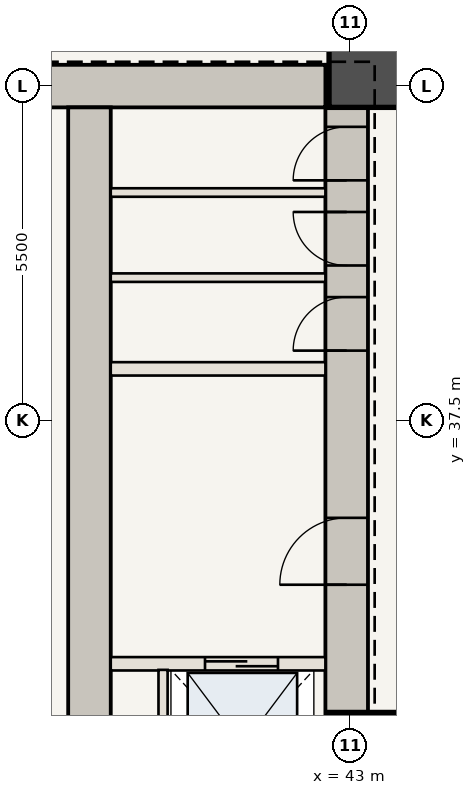
"""IFC4 building model, lengths in metres.
Left out: names, types, materials, properties, quantities, classifications, styles, units other than length and angle.
Written with IfcOpenShell. Run it as: python <this file> out.ifc"""

import sys

from ifc_helpers import new_model, si_unit, direction, frame, frame_2d, origin, origin_2d, place, context, subcontext, project, spatial, rectangle, extrude, element, fill, save


model = new_model("IFC4")
c1 = context("Model", 3, precision=1e-05, world=origin(), true_north=direction((0.0, 1.0)))
c2 = subcontext(c1, "Body", "Model", "MODEL_VIEW")
j1 = project(units=[si_unit("LENGTHUNIT", "METRE"), si_unit("PLANEANGLEUNIT", "RADIAN")], contexts=[c1])
p1 = place(None, origin())
s1 = spatial("IfcSite", under=j1, at=p1, CompositionType="ELEMENT")
p2 = place(p1, origin())
s2 = spatial("IfcBuilding", under=s1, at=p2, CompositionType="ELEMENT")
p3 = place(p2, frame((0.0, 0.0, 29.4)))
s3 = spatial("IfcBuildingStorey", under=s2, at=p3, CompositionType="ELEMENT", Elevation=29.4)
p4 = place(p3, frame((42.94, 30.6, 0.0), z_axis=(0.0, 0.0, 1.0), x_axis=(0.0, 1.0, 0.0)))
e1 = element("IfcWall", 1, at=p4, inside=s3, PredefinedType="SHEAR", context=c2, shape_type="SweptSolid", body=[
    extrude(rectangle(XDim=12.75, YDim=0.7, at=frame_2d((6.375, 0.0))), origin(), (0.0, 0.0, 1.0), 4.9),
])
p5 = place(p4, frame((4.2, 0.0, 0.0)))
e2 = element("IfcOpeningElement", 2, at=p5, cuts=e1, PredefinedType="OPENING", context=c2, shape_type="SweptSolid", body=[
    extrude(rectangle(XDim=1.1, YDim=2.15, at=frame_2d((0.55, 1.075))), frame((0.0, 0.36, 0.0), z_axis=(0.0, -1.0, 0.0), x_axis=(1.0, 0.0, 0.0)), (0.0, 0.0, 1.0), 0.72),
])
p6 = place(p4, frame((8.05, 0.0, 0.0)))
e3 = element("IfcOpeningElement", 3, at=p6, cuts=e1, PredefinedType="OPENING", context=c2, shape_type="SweptSolid", body=[
    extrude(rectangle(XDim=0.88, YDim=2.1, at=frame_2d((0.44, 1.05))), frame((0.0, 0.36, 0.0), z_axis=(0.0, -1.0, 0.0), x_axis=(1.0, 0.0, 0.0)), (0.0, 0.0, 1.0), 0.72),
])
p7 = place(p4, frame((9.45, 0.0, 0.0)))
e4 = element("IfcOpeningElement", 4, at=p7, cuts=e1, PredefinedType="OPENING", context=c2, shape_type="SweptSolid", body=[
    extrude(rectangle(XDim=0.88, YDim=2.1, at=frame_2d((0.44, 1.05))), frame((0.0, 0.36, 0.0), z_axis=(0.0, -1.0, 0.0), x_axis=(1.0, 0.0, 0.0)), (0.0, 0.0, 1.0), 0.72),
])
p8 = place(p4, frame((10.85, 0.0, 0.0)))
e5 = element("IfcOpeningElement", 5, at=p8, cuts=e1, PredefinedType="OPENING", context=c2, shape_type="SweptSolid", body=[
    extrude(rectangle(XDim=0.88, YDim=2.1, at=frame_2d((0.44, 1.05))), frame((0.0, 0.36, 0.0), z_axis=(0.0, -1.0, 0.0), x_axis=(1.0, 0.0, 0.0)), (0.0, 0.0, 1.0), 0.72),
])
p9 = place(p3, frame((37.75, 43.0, 0.0), z_axis=(0.0, 0.0, 1.0), x_axis=(1.0, 0.0, 0.0)))
e6 = element("IfcWall", 6, at=p9, inside=s3, PredefinedType="SHEAR", context=c2, shape_type="SweptSolid", body=[
    extrude(rectangle(XDim=4.84, YDim=0.7, at=frame_2d((2.42, 0.0))), origin(), (0.0, 0.0, 1.0), 4.9),
])
p10 = place(p3, frame((38.71, 30.6, 0.0), z_axis=(0.0, 0.0, 1.0), x_axis=(0.0, 1.0, 0.0)))
e7 = element("IfcWall", 7, at=p10, inside=s3, PredefinedType="SHEAR", context=c2, shape_type="SweptSolid", body=[
    extrude(rectangle(XDim=12.05, YDim=0.7, at=frame_2d((6.025, 0.0))), origin(), (0.0, 0.0, 1.0), 4.9),
])
for number, where, z_axis, x_axis in (
    (8, (43.35, 32.0, 0.0), (0.0, 0.0, 1.0), (1.0, 0.0, 0.0)),
    (9, (43.35, 43.35, 0.0), (0.0, 0.0, 1.0), (1.0, 0.0, 0.0)),
):
    element("IfcColumn", number, at=place(p3, frame(where, z_axis=z_axis, x_axis=x_axis)), inside=s3, PredefinedType="COLUMN", context=c2, shape_type="SweptSolid", body=[
        extrude(rectangle(XDim=1.4, YDim=1.4, at=origin_2d()), origin(), (0.0, 0.0, 1.0), 4.48),
    ])
p11 = place(p3, frame((39.06, 33.5, 0.0), z_axis=(0.0, 0.0, 1.0), x_axis=(1.0, 0.0, 0.0)))
e10 = element("IfcWall", 10, at=p11, inside=s3, PredefinedType="STANDARD", context=c2, shape_type="SweptSolid", body=[
    extrude(rectangle(XDim=3.53, YDim=0.22, at=frame_2d((1.765, 0.0))), origin(), (0.0, 0.0, 1.0), 4.48),
])
p12 = place(p11, frame((1.55, 0.0, 0.0)))
e11 = element("IfcOpeningElement", 11, at=p12, cuts=e10, PredefinedType="OPENING", context=c2, shape_type="SweptSolid", body=[
    extrude(rectangle(XDim=1.2, YDim=2.2, at=frame_2d((0.6, 1.1))), frame((0.0, 0.12, 0.0), z_axis=(0.0, -1.0, 0.0), x_axis=(1.0, 0.0, 0.0)), (0.0, 0.0, 1.0), 0.24),
])
p13 = place(p3, frame((39.92, 30.75, 0.0), z_axis=(0.0, 0.0, 1.0), x_axis=(0.0, 1.0, 0.0)))
e12 = element("IfcWall", 12, at=p13, inside=s3, PredefinedType="STANDARD", context=c2, shape_type="SweptSolid", body=[
    extrude(rectangle(XDim=2.65, YDim=0.15, at=frame_2d((1.325, 0.0))), origin(), (0.0, 0.0, 1.0), 4.48),
])
p14 = place(p3, frame((39.06, 38.35, 0.0), z_axis=(0.0, 0.0, 1.0), x_axis=(1.0, 0.0, 0.0)))
e13 = element("IfcWall", 13, at=p14, inside=s3, PredefinedType="STANDARD", context=c2, shape_type="SweptSolid", body=[
    extrude(rectangle(XDim=3.53, YDim=0.22, at=frame_2d((1.765, 0.0))), origin(), (0.0, 0.0, 1.0), 4.48),
])
for number, where, z_axis, x_axis in (
    (14, (39.06, 39.85, 0.0), (0.0, 0.0, 1.0), (1.0, 0.0, 0.0)),
    (15, (39.06, 41.25, 0.0), (0.0, 0.0, 1.0), (1.0, 0.0, 0.0)),
):
    element("IfcWall", number, at=place(p3, frame(where, z_axis=z_axis, x_axis=x_axis)), inside=s3, PredefinedType="STANDARD", context=c2, shape_type="SweptSolid", body=[
        extrude(rectangle(XDim=3.53, YDim=0.14, at=frame_2d((1.765, 0.0))), origin(), (0.0, 0.0, 1.0), 4.48),
    ])
p15 = place(p5, origin())
e16 = element("IfcDoor", 16, at=p15, inside=s3, OperationType="SINGLE_SWING_LEFT", PredefinedType="DOOR", context=c2, shape_type="SweptSolid", body=[
    extrude(rectangle(XDim=1.1, YDim=2.15, at=frame_2d((0.55, 1.075))), frame((0.0, 0.025, 0.0), z_axis=(0.0, -1.0, 0.0), x_axis=(1.0, 0.0, 0.0)), (0.0, 0.0, 1.0), 0.05),
])
fill(e2, e16)
p16 = place(p6, origin())
e17 = element("IfcDoor", 17, at=p16, inside=s3, OperationType="SINGLE_SWING_LEFT", PredefinedType="DOOR", context=c2, shape_type="SweptSolid", body=[
    extrude(rectangle(XDim=0.88, YDim=2.1, at=frame_2d((0.44, 1.05))), frame((0.0, 0.025, 0.0), z_axis=(0.0, -1.0, 0.0), x_axis=(1.0, 0.0, 0.0)), (0.0, 0.0, 1.0), 0.05),
])
fill(e3, e17)
p17 = place(p7, origin())
e18 = element("IfcDoor", 18, at=p17, inside=s3, OperationType="SINGLE_SWING_RIGHT", PredefinedType="DOOR", context=c2, shape_type="SweptSolid", body=[
    extrude(rectangle(XDim=0.88, YDim=2.1, at=frame_2d((0.44, 1.05))), frame((0.0, 0.025, 0.0), z_axis=(0.0, -1.0, 0.0), x_axis=(1.0, 0.0, 0.0)), (0.0, 0.0, 1.0), 0.05),
])
fill(e4, e18)
p18 = place(p8, origin())
e19 = element("IfcDoor", 19, at=p18, inside=s3, OperationType="SINGLE_SWING_LEFT", PredefinedType="DOOR", context=c2, shape_type="SweptSolid", body=[
    extrude(rectangle(XDim=0.88, YDim=2.1, at=frame_2d((0.44, 1.05))), frame((0.0, 0.025, 0.0), z_axis=(0.0, -1.0, 0.0), x_axis=(1.0, 0.0, 0.0)), (0.0, 0.0, 1.0), 0.05),
])
fill(e5, e19)
p19 = place(p12, origin())
e20 = element("IfcDoor", 20, at=p19, inside=s3, OperationType="DOUBLE_DOOR_SLIDING", PredefinedType="DOOR", context=c2, shape_type="SweptSolid", body=[
    extrude(rectangle(XDim=1.2, YDim=2.2, at=frame_2d((0.6, 1.1))), frame((0.0, 0.025, 0.0), z_axis=(0.0, -1.0, 0.0), x_axis=(1.0, 0.0, 0.0)), (0.0, 0.0, 1.0), 0.05),
])
fill(e11, e20)
save(model, sys.argv[1])
